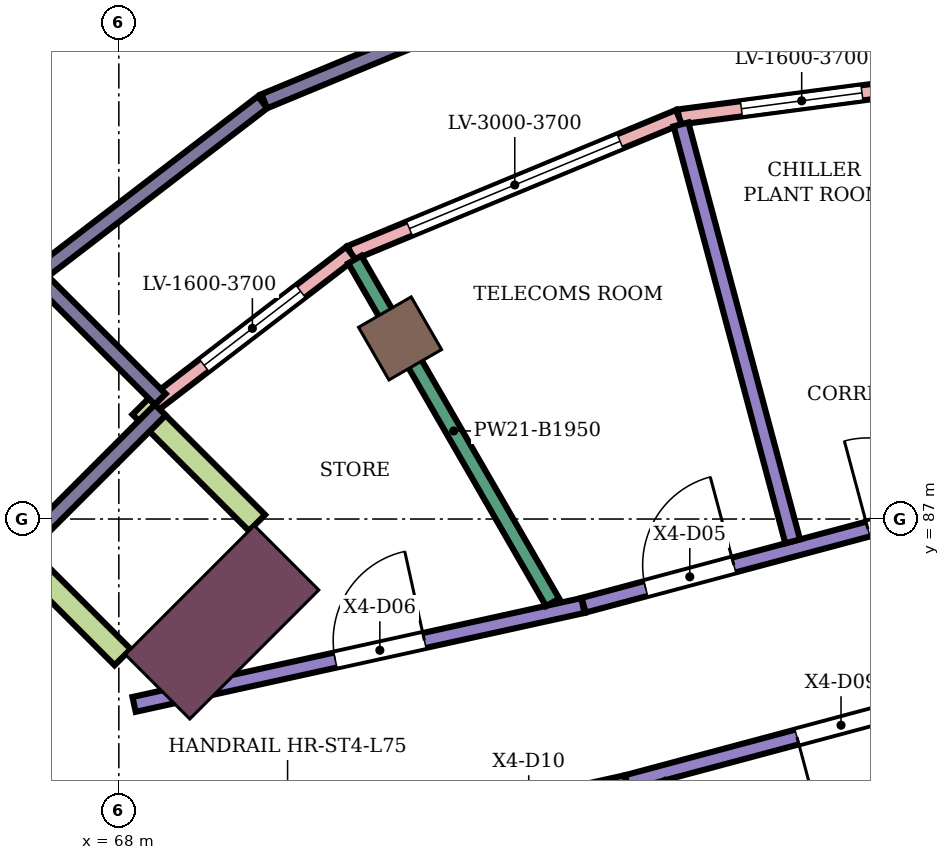
"""IFC4 building model, lengths in metres.
Left out: names, types, materials, properties, quantities, classifications, styles, units other than length and angle.
Written with IfcOpenShell. Run it as: python <this file> out.ifc"""

import sys

from ifc_helpers import new_model, si_unit, direction, frame, frame_2d, origin, origin_2d, place, context, subcontext, project, spatial, rectangle, extrude, element, fill, save


model = new_model("IFC4")
c1 = context("Model", 3, precision=1e-05, world=origin(), true_north=direction((0.0, 1.0)))
c2 = subcontext(c1, "Body", "Model", "MODEL_VIEW")
j1 = project(units=[si_unit("LENGTHUNIT", "METRE"), si_unit("PLANEANGLEUNIT", "RADIAN")], contexts=[c1])
p1 = place(None, origin())
s1 = spatial("IfcSite", under=j1, at=p1, CompositionType="ELEMENT")
p2 = place(p1, origin())
s2 = spatial("IfcBuilding", under=s1, at=p2, CompositionType="ELEMENT")
p3 = place(p2, frame((0.0, 0.0, 328.1)))
s3 = spatial("IfcBuildingStorey", under=s2, at=p3, CompositionType="ELEMENT", Elevation=328.1)
p4 = place(p3, frame((71.7, 89.376, 0.0), z_axis=(0.0, 0.0, 1.0), x_axis=(-0.5, 0.866025403784, 0.0)))
e1 = element("IfcColumn", 1, at=p4, inside=s3, PredefinedType="COLUMN", context=c2, shape_type="SweptSolid", body=[
    extrude(rectangle(XDim=0.8, YDim=0.8, at=origin_2d()), origin(), (0.0, 0.0, 1.0), 5.0),
])
p5 = place(p3, frame((69.358, 85.642, 0.0), z_axis=(0.0, 0.0, 1.0), x_axis=(-0.707106781187, 0.707106781187, 0.0)))
e2 = element("IfcColumn", 2, at=p5, inside=s3, PredefinedType="COLUMN", context=c2, shape_type="SweptSolid", body=[
    extrude(rectangle(XDim=1.2, YDim=2.4, at=origin_2d()), origin(), (0.0, 0.0, 1.0), 5.0),
])
p6 = place(p3, frame((78.6, 92.715, 0.0), z_axis=(0.0, 0.0, 1.0), x_axis=(-0.991446903093, -0.130510682886, 0.0)))
e3 = element("IfcWall", 3, at=p6, inside=s3, PredefinedType="NOTDEFINED", context=c2, shape_type="SweptSolid", body=[
    extrude(rectangle(XDim=3.26, YDim=0.2, at=frame_2d((1.63, 0.0))), origin(), (0.0, 0.0, 1.0), 5.0),
])
p7 = place(p6, frame((0.83, 0.0, 0.5)))
e4 = element("IfcOpeningElement", 4, at=p7, cuts=e3, PredefinedType="OPENING", context=c2, shape_type="SweptSolid", body=[
    extrude(rectangle(XDim=1.6, YDim=3.7, at=frame_2d((0.8, 1.85))), frame((0.0, 0.11, 0.0), z_axis=(0.0, -1.0, 0.0), x_axis=(1.0, 0.0, 0.0)), (0.0, 0.0, 1.0), 0.22),
])
p8 = place(p3, frame((75.367, 92.289, 0.0), z_axis=(0.0, 0.0, 1.0), x_axis=(-0.923881827038, -0.382677892842, 0.0)))
e5 = element("IfcWall", 5, at=p8, inside=s3, PredefinedType="NOTDEFINED", context=c2, shape_type="SweptSolid", body=[
    extrude(rectangle(XDim=4.673, YDim=0.2, at=frame_2d((2.336, 0.0))), origin(), (0.0, 0.0, 1.0), 5.0),
])
p9 = place(p8, frame((0.836, 0.0, 0.5)))
e6 = element("IfcOpeningElement", 6, at=p9, cuts=e5, PredefinedType="OPENING", context=c2, shape_type="SweptSolid", body=[
    extrude(rectangle(XDim=3.0, YDim=3.7, at=frame_2d((1.5, 1.85))), frame((0.0, 0.11, 0.0), z_axis=(0.0, -1.0, 0.0), x_axis=(1.0, 0.0, 0.0)), (0.0, 0.0, 1.0), 0.22),
])
p10 = place(p3, frame((71.051, 90.501, 0.0), z_axis=(0.0, 0.0, 1.0), x_axis=(-0.793338759003, -0.608780431243, 0.0)))
e7 = element("IfcWall", 7, at=p10, inside=s3, PredefinedType="NOTDEFINED", context=c2, shape_type="SweptSolid", body=[
    extrude(rectangle(XDim=3.261, YDim=0.2, at=frame_2d((1.63, 0.0))), origin(), (0.0, 0.0, 1.0), 5.0),
])
p11 = place(p10, frame((0.83, 0.0, 0.5)))
e8 = element("IfcOpeningElement", 8, at=p11, cuts=e7, PredefinedType="OPENING", context=c2, shape_type="SweptSolid", body=[
    extrude(rectangle(XDim=1.6, YDim=3.7, at=frame_2d((0.8, 1.85))), frame((0.0, 0.11, 0.0), z_axis=(0.0, -1.0, 0.0), x_axis=(1.0, 0.0, 0.0)), (0.0, 0.0, 1.0), 0.22),
])
for number, where, z_axis, x_axis in (
    (9, (69.818, 86.95, 0.0), (0.0, 0.0, 1.0), (-0.707, 0.707, 0.0)),
    (10, (68.05, 85.182, 0.0), (0.0, 0.0, 1.0), (-0.707, 0.707, 0.0)),
):
    element("IfcWall", number, at=place(p3, frame(where, z_axis=z_axis, x_axis=x_axis)), inside=s3, PredefinedType="NOTDEFINED", context=c2, shape_type="SweptSolid", body=[
        extrude(rectangle(XDim=2.166, YDim=0.3, at=frame_2d((1.083, 0.0))), origin(), (0.0, 0.0, 1.0), 5.0),
    ])
p12 = place(p3, frame((66.565, 86.455, 0.0), z_axis=(0.0, 0.0, 1.0), x_axis=(0.707106781187, 0.707106781187, 0.0)))
e11 = element("IfcWall", 11, at=p12, inside=s3, PredefinedType="PARAPET", context=c2, shape_type="SweptSolid", body=[
    extrude(rectangle(XDim=2.8, YDim=0.2, at=frame_2d((1.4, 0.0))), origin(), (0.0, 0.0, 1.0), 1.1),
])
p13 = place(p3, frame((68.545, 88.576, 0.0), z_axis=(0.0, 0.0, 1.0), x_axis=(-0.707106781187, 0.707106781187, 0.0)))
e12 = element("IfcWall", 12, at=p13, inside=s3, PredefinedType="PARAPET", context=c2, shape_type="SweptSolid", body=[
    extrude(rectangle(XDim=2.186, YDim=0.2, at=frame_2d((1.093, 0.0))), origin(), (0.0, 0.0, 1.0), 1.1),
])
p14 = place(p3, frame((67.009, 90.272, 0.0), z_axis=(0.0, 0.0, 1.0), x_axis=(0.793370471742, 0.608739102217, 0.0)))
e13 = element("IfcWall", 13, at=p14, inside=s3, PredefinedType="PARAPET", context=c2, shape_type="SweptSolid", body=[
    extrude(rectangle(XDim=3.632, YDim=0.2, at=frame_2d((1.816, 0.0))), origin(), (0.0, 0.0, 1.0), 1.1),
])
p15 = place(p3, frame((69.914, 92.497, 0.0), z_axis=(0.0, 0.0, 1.0), x_axis=(0.92387900007, 0.38268471779, 0.0)))
e14 = element("IfcWall", 14, at=p15, inside=s3, PredefinedType="PARAPET", context=c2, shape_type="SweptSolid", body=[
    extrude(rectangle(XDim=5.246, YDim=0.2, at=frame_2d((2.623, 0.0))), origin(), (0.0, 0.0, 1.0), 1.1),
])
p16 = place(p3, frame((68.201, 84.561, 0.0), z_axis=(0.0, 0.0, 1.0), x_axis=(0.976586307919, 0.215125970504, 0.0)))
e15 = element("IfcWall", 15, at=p16, inside=s3, PredefinedType="PARTITIONING", context=c2, shape_type="SweptSolid", body=[
    extrude(rectangle(XDim=6.047, YDim=0.2, at=frame_2d((3.023, 0.0))), origin(), (0.0, 0.0, 1.0), 4.55),
])
p17 = place(p16, frame((2.711, 0.0, 0.0)))
e16 = element("IfcOpeningElement", 16, at=p17, cuts=e15, PredefinedType="OPENING", context=c2, shape_type="SweptSolid", body=[
    extrude(rectangle(XDim=1.2, YDim=2.4, at=frame_2d((0.6, 1.2))), frame((0.0, 0.11, 0.0), z_axis=(0.0, -1.0, 0.0), x_axis=(1.0, 0.0, 0.0)), (0.0, 0.0, 1.0), 0.22),
])
p18 = place(p3, frame((71.104, 90.414, 0.0), z_axis=(0.0, 0.0, 1.0), x_axis=(0.499845568227, -0.866114546653, 0.0)))
e17 = element("IfcWall", 17, at=p18, inside=s3, PredefinedType="PARTITIONING", context=c2, shape_type="SweptSolid", body=[
    extrude(rectangle(XDim=5.207, YDim=0.2, at=frame_2d((2.604, 0.0))), origin(), (0.0, 0.0, 1.0), 3.05),
])
p19 = place(p3, frame((72.1, 82.963, 0.0), z_axis=(0.0, 0.0, 1.0), x_axis=(0.976538663429, 0.215342143642, 0.0)))
e18 = element("IfcWall", 18, at=p19, inside=s3, PredefinedType="PARTITIONING", context=c2, shape_type="SweptSolid", body=[
    extrude(rectangle(XDim=2.637, YDim=0.2, at=frame_2d((1.318, 0.0))), origin(), (0.0, 0.0, 1.0), 4.55),
])
p20 = place(p19, frame((0.723, 0.0, 0.0)))
e19 = element("IfcOpeningElement", 19, at=p20, cuts=e18, PredefinedType="OPENING", context=c2, shape_type="SweptSolid", body=[
    extrude(rectangle(XDim=1.2, YDim=2.4, at=frame_2d((0.6, 1.2))), frame((0.0, 0.11, 0.0), z_axis=(0.0, -1.0, 0.0), x_axis=(1.0, 0.0, 0.0)), (0.0, 0.0, 1.0), 0.22),
])
p21 = place(p3, frame((74.115, 85.866, 0.0), z_axis=(0.0, 0.0, 1.0), x_axis=(0.965971827496, 0.258647305194, 0.0)))
e20 = element("IfcWall", 20, at=p21, inside=s3, PredefinedType="PARTITIONING", context=c2, shape_type="SweptSolid", body=[
    extrude(rectangle(XDim=6.002, YDim=0.2, at=frame_2d((3.001, 0.0))), origin(), (0.0, 0.0, 1.0), 4.55),
])
p22 = place(p21, frame((3.872, 0.0, 0.0)))
e21 = element("IfcOpeningElement", 21, at=p22, cuts=e20, PredefinedType="OPENING", context=c2, shape_type="SweptSolid", body=[
    extrude(rectangle(XDim=1.2, YDim=2.4, at=frame_2d((0.6, 1.2))), frame((0.0, 0.11, 0.0), z_axis=(0.0, -1.0, 0.0), x_axis=(1.0, 0.0, 0.0)), (0.0, 0.0, 1.0), 0.22),
])
p23 = place(p21, frame((0.846, 0.0, 0.0)))
e22 = element("IfcOpeningElement", 22, at=p23, cuts=e20, PredefinedType="OPENING", context=c2, shape_type="SweptSolid", body=[
    extrude(rectangle(XDim=1.2, YDim=2.4, at=frame_2d((0.6, 1.2))), frame((0.0, 0.11, 0.0), z_axis=(0.0, -1.0, 0.0), x_axis=(1.0, 0.0, 0.0)), (0.0, 0.0, 1.0), 0.22),
])
p24 = place(p3, frame((74.685, 83.533, 0.0), z_axis=(0.0, 0.0, 1.0), x_axis=(0.965946226255, 0.258742899388, 0.0)))
e23 = element("IfcWall", 23, at=p24, inside=s3, PredefinedType="PARTITIONING", context=c2, shape_type="SweptSolid", body=[
    extrude(rectangle(XDim=5.373, YDim=0.2, at=frame_2d((2.686, 0.0))), origin(), (0.0, 0.0, 1.0), 4.55),
])
p25 = place(p24, frame((2.315, 0.0, 0.0)))
e24 = element("IfcOpeningElement", 24, at=p25, cuts=e23, PredefinedType="OPENING", context=c2, shape_type="SweptSolid", body=[
    extrude(rectangle(XDim=1.2, YDim=2.4, at=frame_2d((0.6, 1.2))), frame((0.0, 0.11, 0.0), z_axis=(0.0, -1.0, 0.0), x_axis=(1.0, 0.0, 0.0)), (0.0, 0.0, 1.0), 0.22),
])
p26 = place(p3, frame((75.088, 83.511, 0.0), z_axis=(0.0, 0.0, 1.0), x_axis=(0.499851500703, -0.86611112292, 0.0)))
e25 = element("IfcWall", 25, at=p26, inside=s3, PredefinedType="PARTITIONING", context=c2, shape_type="SweptSolid", body=[
    extrude(rectangle(XDim=2.129, YDim=0.2, at=frame_2d((1.064, 0.0))), origin(), (0.0, 0.0, 1.0), 3.05),
])
p27 = place(p3, frame((75.396, 92.192, 0.0), z_axis=(0.0, 0.0, 1.0), x_axis=(0.258706001961, -0.965956109018, 0.0)))
e26 = element("IfcWall", 26, at=p27, inside=s3, PredefinedType="PARTITIONING", context=c2, shape_type="SweptSolid", body=[
    extrude(rectangle(XDim=5.679, YDim=0.2, at=frame_2d((2.84, 0.0))), origin(), (0.0, 0.0, 1.0), 4.55),
])
p28 = place(p7, origin())
e27 = element("IfcWindow", 27, at=p28, inside=s3, PartitioningType="SINGLE_PANEL", PredefinedType="USERDEFINED", context=c2, shape_type="SweptSolid", body=[
    extrude(rectangle(XDim=1.6, YDim=3.7, at=frame_2d((0.8, 1.85))), frame((0.0, 0.03, 0.0), z_axis=(0.0, -1.0, 0.0), x_axis=(1.0, 0.0, 0.0)), (0.0, 0.0, 1.0), 0.06),
])
fill(e4, e27)
p29 = place(p9, origin())
e28 = element("IfcWindow", 28, at=p29, inside=s3, PartitioningType="SINGLE_PANEL", PredefinedType="USERDEFINED", context=c2, shape_type="SweptSolid", body=[
    extrude(rectangle(XDim=3.0, YDim=3.7, at=frame_2d((1.5, 1.85))), frame((0.0, 0.03, 0.0), z_axis=(0.0, -1.0, 0.0), x_axis=(1.0, 0.0, 0.0)), (0.0, 0.0, 1.0), 0.06),
])
fill(e6, e28)
p30 = place(p11, origin())
e29 = element("IfcWindow", 29, at=p30, inside=s3, PartitioningType="SINGLE_PANEL", PredefinedType="USERDEFINED", context=c2, shape_type="SweptSolid", body=[
    extrude(rectangle(XDim=1.6, YDim=3.7, at=frame_2d((0.8, 1.85))), frame((0.0, 0.03, 0.0), z_axis=(0.0, -1.0, 0.0), x_axis=(1.0, 0.0, 0.0)), (0.0, 0.0, 1.0), 0.06),
])
fill(e8, e29)
p31 = place(p22, origin())
e30 = element("IfcDoor", 30, at=p31, inside=s3, OperationType="SINGLE_SWING_LEFT", PredefinedType="DOOR", context=c2, shape_type="SweptSolid", body=[
    extrude(rectangle(XDim=1.2, YDim=2.4, at=frame_2d((0.6, 1.2))), frame((0.0, 0.025, 0.0), z_axis=(0.0, -1.0, 0.0), x_axis=(1.0, 0.0, 0.0)), (0.0, 0.0, 1.0), 0.05),
])
fill(e21, e30)
p32 = place(p23, origin())
e31 = element("IfcDoor", 31, at=p32, inside=s3, OperationType="SINGLE_SWING_RIGHT", PredefinedType="DOOR", context=c2, shape_type="SweptSolid", body=[
    extrude(rectangle(XDim=1.2, YDim=2.4, at=frame_2d((0.6, 1.2))), frame((0.0, 0.025, 0.0), z_axis=(0.0, -1.0, 0.0), x_axis=(1.0, 0.0, 0.0)), (0.0, 0.0, 1.0), 0.05),
])
fill(e22, e31)
p33 = place(p17, origin())
e32 = element("IfcDoor", 32, at=p33, inside=s3, OperationType="SINGLE_SWING_RIGHT", PredefinedType="DOOR", context=c2, shape_type="SweptSolid", body=[
    extrude(rectangle(XDim=1.2, YDim=2.4, at=frame_2d((0.6, 1.2))), frame((0.0, 0.025, 0.0), z_axis=(0.0, -1.0, 0.0), x_axis=(1.0, 0.0, 0.0)), (0.0, 0.0, 1.0), 0.05),
])
fill(e16, e32)
p34 = place(p25, frame((1.2, 0.0, 0.0), z_axis=(0.0, 0.0, 1.0), x_axis=(-1.0, 0.0, 0.0)))
e33 = element("IfcDoor", 33, at=p34, inside=s3, OperationType="SINGLE_SWING_RIGHT", PredefinedType="DOOR", context=c2, shape_type="SweptSolid", body=[
    extrude(rectangle(XDim=1.2, YDim=2.4, at=frame_2d((0.6, 1.2))), frame((0.0, 0.025, 0.0), z_axis=(0.0, -1.0, 0.0), x_axis=(1.0, 0.0, 0.0)), (0.0, 0.0, 1.0), 0.05),
])
fill(e24, e33)
save(model, sys.argv[1])
